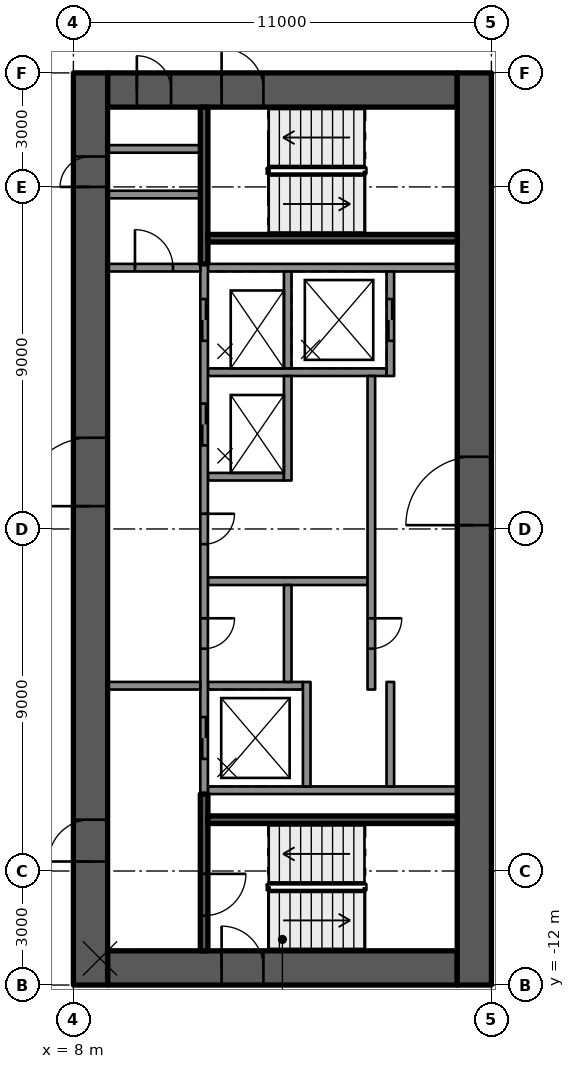
"""IFC4 building model, lengths in metres.
Left out: names, types, materials, properties, quantities, classifications, styles, units other than length and angle.
Written with IfcOpenShell. Run it as: python <this file> out.ifc"""

import sys

from ifc_helpers import new_model, si_unit, direction, frame, frame_2d, origin, place, context, subcontext, project, spatial, rectangle, extrude, element, fill, save


model = new_model("IFC4")
c1 = context("Model", 3, precision=1e-05, world=origin(), true_north=direction((0.0, 1.0)))
c2 = subcontext(c1, "Body", "Model", "MODEL_VIEW")
j1 = project(units=[si_unit("LENGTHUNIT", "METRE"), si_unit("PLANEANGLEUNIT", "RADIAN")], contexts=[c1])
p1 = place(None, origin())
s1 = spatial("IfcSite", under=j1, at=p1, CompositionType="ELEMENT")
p2 = place(p1, origin())
s2 = spatial("IfcBuilding", under=s1, at=p2, CompositionType="ELEMENT")
p3 = place(p2, frame((0.0, 0.0, 232.0)))
s3 = spatial("IfcBuildingStorey", under=s2, at=p3, CompositionType="ELEMENT", Elevation=232.0)
p4 = place(p3, frame((8.9, 11.55, 0.0), z_axis=(0.0, 0.0, 1.0), x_axis=(1.0, 0.0, 0.0)))
e1 = element("IfcWall", 1, at=p4, inside=s3, PredefinedType="SHEAR", context=c2, shape_type="SweptSolid", body=[
    extrude(rectangle(XDim=9.2, YDim=0.9, at=frame_2d((4.6, 0.0))), origin(), (0.0, 0.0, 1.0), 3.5),
])
p5 = place(p4, frame((3.0, 0.0, 0.0)))
e2 = element("IfcOpeningElement", 2, at=p5, cuts=e1, PredefinedType="OPENING", context=c2, shape_type="SweptSolid", body=[
    extrude(rectangle(XDim=1.1, YDim=2.1, at=frame_2d((0.55, 1.05))), frame((0.0, 0.46, 0.0), z_axis=(0.0, -1.0, 0.0), x_axis=(1.0, 0.0, 0.0)), (0.0, 0.0, 1.0), 0.92),
])
p6 = place(p4, frame((0.77, 0.0, 0.0)))
e3 = element("IfcOpeningElement", 3, at=p6, cuts=e1, PredefinedType="OPENING", context=c2, shape_type="SweptSolid", body=[
    extrude(rectangle(XDim=0.9, YDim=2.1, at=frame_2d((0.45, 1.05))), frame((0.0, 0.46, 0.0), z_axis=(0.0, -1.0, 0.0), x_axis=(1.0, 0.0, 0.0)), (0.0, 0.0, 1.0), 0.92),
])
p7 = place(p3, frame((8.9, -11.55, 0.0), z_axis=(0.0, 0.0, 1.0), x_axis=(1.0, 0.0, 0.0)))
e4 = element("IfcWall", 4, at=p7, inside=s3, PredefinedType="SHEAR", context=c2, shape_type="SweptSolid", body=[
    extrude(rectangle(XDim=9.2, YDim=0.9, at=frame_2d((4.6, 0.0))), origin(), (0.0, 0.0, 1.0), 3.5),
])
p8 = place(p7, frame((3.0, 0.0, 0.0)))
e5 = element("IfcOpeningElement", 5, at=p8, cuts=e4, PredefinedType="OPENING", context=c2, shape_type="SweptSolid", body=[
    extrude(rectangle(XDim=1.1, YDim=2.1, at=frame_2d((0.55, 1.05))), frame((0.0, 0.46, 0.0), z_axis=(0.0, -1.0, 0.0), x_axis=(1.0, 0.0, 0.0)), (0.0, 0.0, 1.0), 0.92),
])
p9 = place(p3, frame((8.45, -12.0, 0.0), z_axis=(0.0, 0.0, 1.0), x_axis=(0.0, 1.0, 0.0)))
e6 = element("IfcWall", 6, at=p9, inside=s3, PredefinedType="SHEAR", context=c2, shape_type="SweptSolid", body=[
    extrude(rectangle(XDim=24.0, YDim=0.9, at=frame_2d((12.0, 0.0))), origin(), (0.0, 0.0, 1.0), 3.5),
])
p10 = place(p9, frame((12.6, 0.0, 0.0)))
e7 = element("IfcOpeningElement", 7, at=p10, cuts=e6, PredefinedType="OPENING", context=c2, shape_type="SweptSolid", body=[
    extrude(rectangle(XDim=1.8, YDim=2.1, at=frame_2d((0.9, 1.05))), frame((0.0, 0.46, 0.0), z_axis=(0.0, -1.0, 0.0), x_axis=(1.0, 0.0, 0.0)), (0.0, 0.0, 1.0), 0.92),
])
p11 = place(p9, frame((3.25, 0.0, 0.0)))
e8 = element("IfcOpeningElement", 8, at=p11, cuts=e6, PredefinedType="OPENING", context=c2, shape_type="SweptSolid", body=[
    extrude(rectangle(XDim=1.1, YDim=2.1, at=frame_2d((0.55, 1.05))), frame((0.0, 0.46, 0.0), z_axis=(0.0, -1.0, 0.0), x_axis=(1.0, 0.0, 0.0)), (0.0, 0.0, 1.0), 0.92),
])
p12 = place(p9, frame((21.0, 0.0, 0.0)))
e9 = element("IfcOpeningElement", 9, at=p12, cuts=e6, PredefinedType="OPENING", context=c2, shape_type="SweptSolid", body=[
    extrude(rectangle(XDim=0.8, YDim=2.1, at=frame_2d((0.4, 1.05))), frame((0.0, 0.46, 0.0), z_axis=(0.0, -1.0, 0.0), x_axis=(1.0, 0.0, 0.0)), (0.0, 0.0, 1.0), 0.92),
])
p13 = place(p3, frame((18.55, -12.0, 0.0), z_axis=(0.0, 0.0, 1.0), x_axis=(0.0, 1.0, 0.0)))
e10 = element("IfcWall", 10, at=p13, inside=s3, PredefinedType="SHEAR", context=c2, shape_type="SweptSolid", body=[
    extrude(rectangle(XDim=24.0, YDim=0.9, at=frame_2d((12.0, 0.0))), origin(), (0.0, 0.0, 1.0), 3.5),
])
p14 = place(p13, frame((12.1, 0.0, 0.0)))
e11 = element("IfcOpeningElement", 11, at=p14, cuts=e10, PredefinedType="OPENING", context=c2, shape_type="SweptSolid", body=[
    extrude(rectangle(XDim=1.8, YDim=2.1, at=frame_2d((0.9, 1.05))), frame((0.0, 0.46, 0.0), z_axis=(0.0, -1.0, 0.0), x_axis=(1.0, 0.0, 0.0)), (0.0, 0.0, 1.0), 0.92),
])
for number, where, z_axis, x_axis in (
    (12, (11.54, -6.875, 0.0), (0.0, 0.0, 1.0), (1.0, 0.0, 0.0)),
    (13, (11.54, 6.875, 0.0), (0.0, 0.0, 1.0), (1.0, 0.0, 0.0)),
):
    element("IfcWall", number, at=place(p3, frame(where, z_axis=z_axis, x_axis=x_axis)), inside=s3, PredefinedType="SOLIDWALL", context=c2, shape_type="SweptSolid", body=[
        extrude(rectangle(XDim=6.56, YDim=0.2, at=frame_2d((3.28, 0.0))), origin(), (0.0, 0.0, 1.0), 3.09),
    ])
p15 = place(p3, frame((11.54, 4.125, 0.0), z_axis=(0.0, 0.0, 1.0), x_axis=(1.0, 0.0, 0.0)))
e14 = element("IfcWall", 14, at=p15, inside=s3, PredefinedType="SOLIDWALL", context=c2, shape_type="SweptSolid", body=[
    extrude(rectangle(XDim=4.7, YDim=0.2, at=frame_2d((2.35, 0.0))), origin(), (0.0, 0.0, 1.0), 3.09),
])
p16 = place(p3, frame((11.54, 1.375, 0.0), z_axis=(0.0, 0.0, 1.0), x_axis=(1.0, 0.0, 0.0)))
e15 = element("IfcWall", 15, at=p16, inside=s3, PredefinedType="SOLIDWALL", context=c2, shape_type="SweptSolid", body=[
    extrude(rectangle(XDim=2.0, YDim=0.2, at=frame_2d((1.0, 0.0))), origin(), (0.0, 0.0, 1.0), 3.09),
])
p17 = place(p3, frame((11.54, -1.375, 0.0), z_axis=(0.0, 0.0, 1.0), x_axis=(1.0, 0.0, 0.0)))
e16 = element("IfcWall", 16, at=p17, inside=s3, PredefinedType="SOLIDWALL", context=c2, shape_type="SweptSolid", body=[
    extrude(rectangle(XDim=4.2, YDim=0.2, at=frame_2d((2.1, 0.0))), origin(), (0.0, 0.0, 1.0), 3.09),
])
p18 = place(p3, frame((11.54, -4.125, 0.0), z_axis=(0.0, 0.0, 1.0), x_axis=(1.0, 0.0, 0.0)))
e17 = element("IfcWall", 17, at=p18, inside=s3, PredefinedType="SOLIDWALL", context=c2, shape_type="SweptSolid", body=[
    extrude(rectangle(XDim=2.5, YDim=0.2, at=frame_2d((1.25, 0.0))), origin(), (0.0, 0.0, 1.0), 3.09),
])
p19 = place(p3, frame((11.44, 6.975, 0.0), z_axis=(0.0, 0.0, 1.0), x_axis=(0.0, -1.0, 0.0)))
e18 = element("IfcWall", 18, at=p19, inside=s3, PredefinedType="SOLIDWALL", context=c2, shape_type="SweptSolid", body=[
    extrude(rectangle(XDim=13.95, YDim=0.2, at=frame_2d((6.975, 0.0))), origin(), (0.0, 0.0, 1.0), 3.09),
])
p20 = place(p19, frame((0.925, 0.0, 0.0)))
e19 = element("IfcOpeningElement", 19, at=p20, cuts=e18, PredefinedType="OPENING", context=c2, shape_type="SweptSolid", body=[
    extrude(rectangle(XDim=1.1, YDim=2.1, at=frame_2d((0.55, 1.05))), frame((0.0, 0.11, 0.0), z_axis=(0.0, -1.0, 0.0), x_axis=(1.0, 0.0, 0.0)), (0.0, 0.0, 1.0), 0.22),
])
p21 = place(p19, frame((3.675, 0.0, 0.0)))
e20 = element("IfcOpeningElement", 20, at=p21, cuts=e18, PredefinedType="OPENING", context=c2, shape_type="SweptSolid", body=[
    extrude(rectangle(XDim=1.1, YDim=2.1, at=frame_2d((0.55, 1.05))), frame((0.0, 0.11, 0.0), z_axis=(0.0, -1.0, 0.0), x_axis=(1.0, 0.0, 0.0)), (0.0, 0.0, 1.0), 0.22),
])
p22 = place(p19, frame((11.925, 0.0, 0.0)))
e21 = element("IfcOpeningElement", 21, at=p22, cuts=e18, PredefinedType="OPENING", context=c2, shape_type="SweptSolid", body=[
    extrude(rectangle(XDim=1.1, YDim=2.1, at=frame_2d((0.55, 1.05))), frame((0.0, 0.11, 0.0), z_axis=(0.0, -1.0, 0.0), x_axis=(1.0, 0.0, 0.0)), (0.0, 0.0, 1.0), 0.22),
])
p23 = place(p19, frame((6.575, 0.0, 0.0)))
e22 = element("IfcOpeningElement", 22, at=p23, cuts=e18, PredefinedType="OPENING", context=c2, shape_type="SweptSolid", body=[
    extrude(rectangle(XDim=0.8, YDim=2.1, at=frame_2d((0.4, 1.05))), frame((0.0, 0.11, 0.0), z_axis=(0.0, -1.0, 0.0), x_axis=(1.0, 0.0, 0.0)), (0.0, 0.0, 1.0), 0.22),
])
p24 = place(p19, frame((9.325, 0.0, 0.0)))
e23 = element("IfcOpeningElement", 23, at=p24, cuts=e18, PredefinedType="OPENING", context=c2, shape_type="SweptSolid", body=[
    extrude(rectangle(XDim=0.8, YDim=2.1, at=frame_2d((0.4, 1.05))), frame((0.0, 0.11, 0.0), z_axis=(0.0, -1.0, 0.0), x_axis=(1.0, 0.0, 0.0)), (0.0, 0.0, 1.0), 0.22),
])
p25 = place(p3, frame((13.64, 6.775, 0.0), z_axis=(0.0, 0.0, 1.0), x_axis=(0.0, -1.0, 0.0)))
e24 = element("IfcWall", 24, at=p25, inside=s3, PredefinedType="SOLIDWALL", context=c2, shape_type="SweptSolid", body=[
    extrude(rectangle(XDim=2.55, YDim=0.2, at=frame_2d((1.275, 0.0))), origin(), (0.0, 0.0, 1.0), 3.09),
])
p26 = place(p3, frame((13.64, 4.025, 0.0), z_axis=(0.0, 0.0, 1.0), x_axis=(0.0, -1.0, 0.0)))
e25 = element("IfcWall", 25, at=p26, inside=s3, PredefinedType="SOLIDWALL", context=c2, shape_type="SweptSolid", body=[
    extrude(rectangle(XDim=2.75, YDim=0.2, at=frame_2d((1.375, 0.0))), origin(), (0.0, 0.0, 1.0), 3.09),
])
p27 = place(p3, frame((13.64, -1.475, 0.0), z_axis=(0.0, 0.0, 1.0), x_axis=(0.0, -1.0, 0.0)))
e26 = element("IfcWall", 26, at=p27, inside=s3, PredefinedType="SOLIDWALL", context=c2, shape_type="SweptSolid", body=[
    extrude(rectangle(XDim=2.55, YDim=0.2, at=frame_2d((1.275, 0.0))), origin(), (0.0, 0.0, 1.0), 3.09),
])
p28 = place(p3, frame((14.14, -4.025, 0.0), z_axis=(0.0, 0.0, 1.0), x_axis=(0.0, -1.0, 0.0)))
e27 = element("IfcWall", 27, at=p28, inside=s3, PredefinedType="SOLIDWALL", context=c2, shape_type="SweptSolid", body=[
    extrude(rectangle(XDim=2.75, YDim=0.2, at=frame_2d((1.375, 0.0))), origin(), (0.0, 0.0, 1.0), 3.09),
])
p29 = place(p3, frame((16.34, 6.775, 0.0), z_axis=(0.0, 0.0, 1.0), x_axis=(0.0, -1.0, 0.0)))
e28 = element("IfcWall", 28, at=p29, inside=s3, PredefinedType="SOLIDWALL", context=c2, shape_type="SweptSolid", body=[
    extrude(rectangle(XDim=2.75, YDim=0.2, at=frame_2d((1.375, 0.0))), origin(), (0.0, 0.0, 1.0), 3.09),
])
p30 = place(p29, frame((0.725, 0.0, 0.0)))
e29 = element("IfcOpeningElement", 29, at=p30, cuts=e28, PredefinedType="OPENING", context=c2, shape_type="SweptSolid", body=[
    extrude(rectangle(XDim=1.1, YDim=2.1, at=frame_2d((0.55, 1.05))), frame((0.0, 0.11, 0.0), z_axis=(0.0, -1.0, 0.0), x_axis=(1.0, 0.0, 0.0)), (0.0, 0.0, 1.0), 0.22),
])
p31 = place(p3, frame((15.84, 4.025, 0.0), z_axis=(0.0, 0.0, 1.0), x_axis=(0.0, -1.0, 0.0)))
e30 = element("IfcWall", 30, at=p31, inside=s3, PredefinedType="SOLIDWALL", context=c2, shape_type="SweptSolid", body=[
    extrude(rectangle(XDim=8.25, YDim=0.2, at=frame_2d((4.125, 0.0))), origin(), (0.0, 0.0, 1.0), 3.09),
])
p32 = place(p31, frame((6.375, 0.0, 0.0)))
e31 = element("IfcOpeningElement", 31, at=p32, cuts=e30, PredefinedType="OPENING", context=c2, shape_type="SweptSolid", body=[
    extrude(rectangle(XDim=0.8, YDim=2.1, at=frame_2d((0.4, 1.05))), frame((0.0, 0.11, 0.0), z_axis=(0.0, -1.0, 0.0), x_axis=(1.0, 0.0, 0.0)), (0.0, 0.0, 1.0), 0.22),
])
p33 = place(p3, frame((16.34, -4.025, 0.0), z_axis=(0.0, 0.0, 1.0), x_axis=(0.0, -1.0, 0.0)))
e32 = element("IfcWall", 32, at=p33, inside=s3, PredefinedType="SOLIDWALL", context=c2, shape_type="SweptSolid", body=[
    extrude(rectangle(XDim=2.75, YDim=0.2, at=frame_2d((1.375, 0.0))), origin(), (0.0, 0.0, 1.0), 3.09),
])
p34 = place(p3, frame((11.44, -6.975, 0.0), z_axis=(0.0, 0.0, 1.0), x_axis=(0.0, -1.0, 0.0)))
e33 = element("IfcWall", 33, at=p34, inside=s3, PredefinedType="SOLIDWALL", context=c2, shape_type="SweptSolid", body=[
    extrude(rectangle(XDim=4.125, YDim=0.2, at=frame_2d((2.062, 0.0))), origin(), (0.0, 0.0, 1.0), 3.09),
])
p35 = place(p34, frame((2.1, 0.0, 0.0)))
e34 = element("IfcOpeningElement", 34, at=p35, cuts=e33, PredefinedType="OPENING", context=c2, shape_type="SweptSolid", body=[
    extrude(rectangle(XDim=1.1, YDim=2.1, at=frame_2d((0.55, 1.05))), frame((0.0, 0.11, 0.0), z_axis=(0.0, -1.0, 0.0), x_axis=(1.0, 0.0, 0.0)), (0.0, 0.0, 1.0), 0.22),
])
p36 = place(p3, frame((11.54, -7.65, 0.0), z_axis=(0.0, 0.0, 1.0), x_axis=(1.0, 0.0, 0.0)))
e35 = element("IfcWall", 35, at=p36, inside=s3, PredefinedType="SOLIDWALL", context=c2, shape_type="SweptSolid", body=[
    extrude(rectangle(XDim=6.56, YDim=0.2, at=frame_2d((3.28, 0.0))), origin(), (0.0, 0.0, 1.0), 3.09),
])
p37 = place(p3, frame((11.44, 11.1, 0.0), z_axis=(0.0, 0.0, 1.0), x_axis=(0.0, -1.0, 0.0)))
e36 = element("IfcWall", 36, at=p37, inside=s3, PredefinedType="SOLIDWALL", context=c2, shape_type="SweptSolid", body=[
    extrude(rectangle(XDim=4.125, YDim=0.2, at=frame_2d((2.062, 0.0))), origin(), (0.0, 0.0, 1.0), 3.09),
])
p38 = place(p3, frame((11.54, 7.65, 0.0), z_axis=(0.0, 0.0, 1.0), x_axis=(1.0, 0.0, 0.0)))
e37 = element("IfcWall", 37, at=p38, inside=s3, PredefinedType="SOLIDWALL", context=c2, shape_type="SweptSolid", body=[
    extrude(rectangle(XDim=6.56, YDim=0.2, at=frame_2d((3.28, 0.0))), origin(), (0.0, 0.0, 1.0), 3.09),
])
p39 = place(p3, frame((8.9, -4.125, 0.0), z_axis=(0.0, 0.0, 1.0), x_axis=(1.0, 0.0, 0.0)))
e38 = element("IfcWall", 38, at=p39, inside=s3, PredefinedType="PARTITIONING", context=c2, shape_type="SweptSolid", body=[
    extrude(rectangle(XDim=2.44, YDim=0.2, at=frame_2d((1.22, 0.0))), origin(), (0.0, 0.0, 1.0), 3.09),
])
p40 = place(p3, frame((8.9, 6.875, 0.0), z_axis=(0.0, 0.0, 1.0), x_axis=(1.0, 0.0, 0.0)))
e39 = element("IfcWall", 39, at=p40, inside=s3, PredefinedType="PARTITIONING", context=c2, shape_type="SweptSolid", body=[
    extrude(rectangle(XDim=2.44, YDim=0.2, at=frame_2d((1.22, 0.0))), origin(), (0.0, 0.0, 1.0), 3.09),
])
p41 = place(p40, frame((0.72, 0.0, 0.0)))
e40 = element("IfcOpeningElement", 40, at=p41, cuts=e39, PredefinedType="OPENING", context=c2, shape_type="SweptSolid", body=[
    extrude(rectangle(XDim=1.0, YDim=2.1, at=frame_2d((0.5, 1.05))), frame((0.0, 0.11, 0.0), z_axis=(0.0, -1.0, 0.0), x_axis=(1.0, 0.0, 0.0)), (0.0, 0.0, 1.0), 0.22),
])
for number, where, z_axis, x_axis in (
    (41, (8.9, 10.0, 0.0), (0.0, 0.0, 1.0), (1.0, 0.0, 0.0)),
    (42, (8.9, 8.8, 0.0), (0.0, 0.0, 1.0), (1.0, 0.0, 0.0)),
):
    element("IfcWall", number, at=place(p3, frame(where, z_axis=z_axis, x_axis=x_axis)), inside=s3, PredefinedType="PARTITIONING", context=c2, shape_type="SweptSolid", body=[
        extrude(rectangle(XDim=2.44, YDim=0.2, at=frame_2d((1.22, 0.0))), origin(), (0.0, 0.0, 1.0), 3.09),
    ])
p42 = place(p20, origin())
e43 = element("IfcDoor", 43, at=p42, inside=s3, OperationType="DOUBLE_DOOR_SLIDING", PredefinedType="DOOR", context=c2, shape_type="SweptSolid", body=[
    extrude(rectangle(XDim=1.1, YDim=2.1, at=frame_2d((0.55, 1.05))), frame((0.0, 0.025, 0.0), z_axis=(0.0, -1.0, 0.0), x_axis=(1.0, 0.0, 0.0)), (0.0, 0.0, 1.0), 0.05),
])
fill(e19, e43)
p43 = place(p30, origin())
e44 = element("IfcDoor", 44, at=p43, inside=s3, OperationType="DOUBLE_DOOR_SLIDING", PredefinedType="DOOR", context=c2, shape_type="SweptSolid", body=[
    extrude(rectangle(XDim=1.1, YDim=2.1, at=frame_2d((0.55, 1.05))), frame((0.0, 0.025, 0.0), z_axis=(0.0, -1.0, 0.0), x_axis=(1.0, 0.0, 0.0)), (0.0, 0.0, 1.0), 0.05),
])
fill(e29, e44)
p44 = place(p21, origin())
e45 = element("IfcDoor", 45, at=p44, inside=s3, OperationType="DOUBLE_DOOR_SLIDING", PredefinedType="DOOR", context=c2, shape_type="SweptSolid", body=[
    extrude(rectangle(XDim=1.1, YDim=2.1, at=frame_2d((0.55, 1.05))), frame((0.0, 0.025, 0.0), z_axis=(0.0, -1.0, 0.0), x_axis=(1.0, 0.0, 0.0)), (0.0, 0.0, 1.0), 0.05),
])
fill(e20, e45)
p45 = place(p22, origin())
e46 = element("IfcDoor", 46, at=p45, inside=s3, OperationType="DOUBLE_DOOR_SLIDING", PredefinedType="DOOR", context=c2, shape_type="SweptSolid", body=[
    extrude(rectangle(XDim=1.1, YDim=2.1, at=frame_2d((0.55, 1.05))), frame((0.0, 0.025, 0.0), z_axis=(0.0, -1.0, 0.0), x_axis=(1.0, 0.0, 0.0)), (0.0, 0.0, 1.0), 0.05),
])
fill(e21, e46)
p46 = place(p23, origin())
e47 = element("IfcDoor", 47, at=p46, inside=s3, OperationType="SINGLE_SWING_RIGHT", PredefinedType="DOOR", context=c2, shape_type="SweptSolid", body=[
    extrude(rectangle(XDim=0.8, YDim=2.1, at=frame_2d((0.4, 1.05))), frame((0.0, 0.025, 0.0), z_axis=(0.0, -1.0, 0.0), x_axis=(1.0, 0.0, 0.0)), (0.0, 0.0, 1.0), 0.05),
])
fill(e22, e47)
p47 = place(p24, origin())
e48 = element("IfcDoor", 48, at=p47, inside=s3, OperationType="SINGLE_SWING_LEFT", PredefinedType="DOOR", context=c2, shape_type="SweptSolid", body=[
    extrude(rectangle(XDim=0.8, YDim=2.1, at=frame_2d((0.4, 1.05))), frame((0.0, 0.025, 0.0), z_axis=(0.0, -1.0, 0.0), x_axis=(1.0, 0.0, 0.0)), (0.0, 0.0, 1.0), 0.05),
])
fill(e23, e48)
p48 = place(p32, origin())
e49 = element("IfcDoor", 49, at=p48, inside=s3, OperationType="SINGLE_SWING_LEFT", PredefinedType="DOOR", context=c2, shape_type="SweptSolid", body=[
    extrude(rectangle(XDim=0.8, YDim=2.1, at=frame_2d((0.4, 1.05))), frame((0.0, 0.025, 0.0), z_axis=(0.0, -1.0, 0.0), x_axis=(1.0, 0.0, 0.0)), (0.0, 0.0, 1.0), 0.05),
])
fill(e31, e49)
p49 = place(p10, origin())
e50 = element("IfcDoor", 50, at=p49, inside=s3, OperationType="SINGLE_SWING_RIGHT", PredefinedType="DOOR", context=c2, shape_type="SweptSolid", body=[
    extrude(rectangle(XDim=1.8, YDim=2.1, at=frame_2d((0.9, 1.05))), frame((0.0, 0.025, 0.0), z_axis=(0.0, -1.0, 0.0), x_axis=(1.0, 0.0, 0.0)), (0.0, 0.0, 1.0), 0.05),
])
fill(e7, e50)
p50 = place(p14, origin())
e51 = element("IfcDoor", 51, at=p50, inside=s3, OperationType="SINGLE_SWING_RIGHT", PredefinedType="DOOR", context=c2, shape_type="SweptSolid", body=[
    extrude(rectangle(XDim=1.8, YDim=2.1, at=frame_2d((0.9, 1.05))), frame((0.0, 0.025, 0.0), z_axis=(0.0, -1.0, 0.0), x_axis=(1.0, 0.0, 0.0)), (0.0, 0.0, 1.0), 0.05),
])
fill(e11, e51)
p51 = place(p11, origin())
e52 = element("IfcDoor", 52, at=p51, inside=s3, OperationType="SINGLE_SWING_LEFT", PredefinedType="DOOR", context=c2, shape_type="SweptSolid", body=[
    extrude(rectangle(XDim=1.1, YDim=2.1, at=frame_2d((0.55, 1.05))), frame((0.0, 0.025, 0.0), z_axis=(0.0, -1.0, 0.0), x_axis=(1.0, 0.0, 0.0)), (0.0, 0.0, 1.0), 0.05),
])
fill(e8, e52)
p52 = place(p8, origin())
e53 = element("IfcDoor", 53, at=p52, inside=s3, OperationType="SINGLE_SWING_LEFT", PredefinedType="DOOR", context=c2, shape_type="SweptSolid", body=[
    extrude(rectangle(XDim=1.1, YDim=2.1, at=frame_2d((0.55, 1.05))), frame((0.0, 0.025, 0.0), z_axis=(0.0, -1.0, 0.0), x_axis=(1.0, 0.0, 0.0)), (0.0, 0.0, 1.0), 0.05),
])
fill(e5, e53)
p53 = place(p5, origin())
e54 = element("IfcDoor", 54, at=p53, inside=s3, OperationType="SINGLE_SWING_LEFT", PredefinedType="DOOR", context=c2, shape_type="SweptSolid", body=[
    extrude(rectangle(XDim=1.1, YDim=2.1, at=frame_2d((0.55, 1.05))), frame((0.0, 0.025, 0.0), z_axis=(0.0, -1.0, 0.0), x_axis=(1.0, 0.0, 0.0)), (0.0, 0.0, 1.0), 0.05),
])
fill(e2, e54)
p54 = place(p35, origin())
e55 = element("IfcDoor", 55, at=p54, inside=s3, OperationType="SINGLE_SWING_RIGHT", PredefinedType="DOOR", context=c2, shape_type="SweptSolid", body=[
    extrude(rectangle(XDim=1.1, YDim=2.1, at=frame_2d((0.55, 1.05))), frame((0.0, 0.025, 0.0), z_axis=(0.0, -1.0, 0.0), x_axis=(1.0, 0.0, 0.0)), (0.0, 0.0, 1.0), 0.05),
])
fill(e34, e55)
p55 = place(p6, origin())
e56 = element("IfcDoor", 56, at=p55, inside=s3, OperationType="SINGLE_SWING_LEFT", PredefinedType="DOOR", context=c2, shape_type="SweptSolid", body=[
    extrude(rectangle(XDim=0.9, YDim=2.1, at=frame_2d((0.45, 1.05))), frame((0.0, 0.025, 0.0), z_axis=(0.0, -1.0, 0.0), x_axis=(1.0, 0.0, 0.0)), (0.0, 0.0, 1.0), 0.05),
])
fill(e3, e56)
p56 = place(p12, origin())
e57 = element("IfcDoor", 57, at=p56, inside=s3, OperationType="SINGLE_SWING_RIGHT", PredefinedType="DOOR", context=c2, shape_type="SweptSolid", body=[
    extrude(rectangle(XDim=0.8, YDim=2.1, at=frame_2d((0.4, 1.05))), frame((0.0, 0.025, 0.0), z_axis=(0.0, -1.0, 0.0), x_axis=(1.0, 0.0, 0.0)), (0.0, 0.0, 1.0), 0.05),
])
fill(e9, e57)
p57 = place(p41, origin())
e58 = element("IfcDoor", 58, at=p57, inside=s3, OperationType="SINGLE_SWING_RIGHT", PredefinedType="DOOR", context=c2, shape_type="SweptSolid", body=[
    extrude(rectangle(XDim=1.0, YDim=2.1, at=frame_2d((0.5, 1.05))), frame((0.0, 0.025, 0.0), z_axis=(0.0, -1.0, 0.0), x_axis=(1.0, 0.0, 0.0)), (0.0, 0.0, 1.0), 0.05),
])
fill(e40, e58)
save(model, sys.argv[1])
